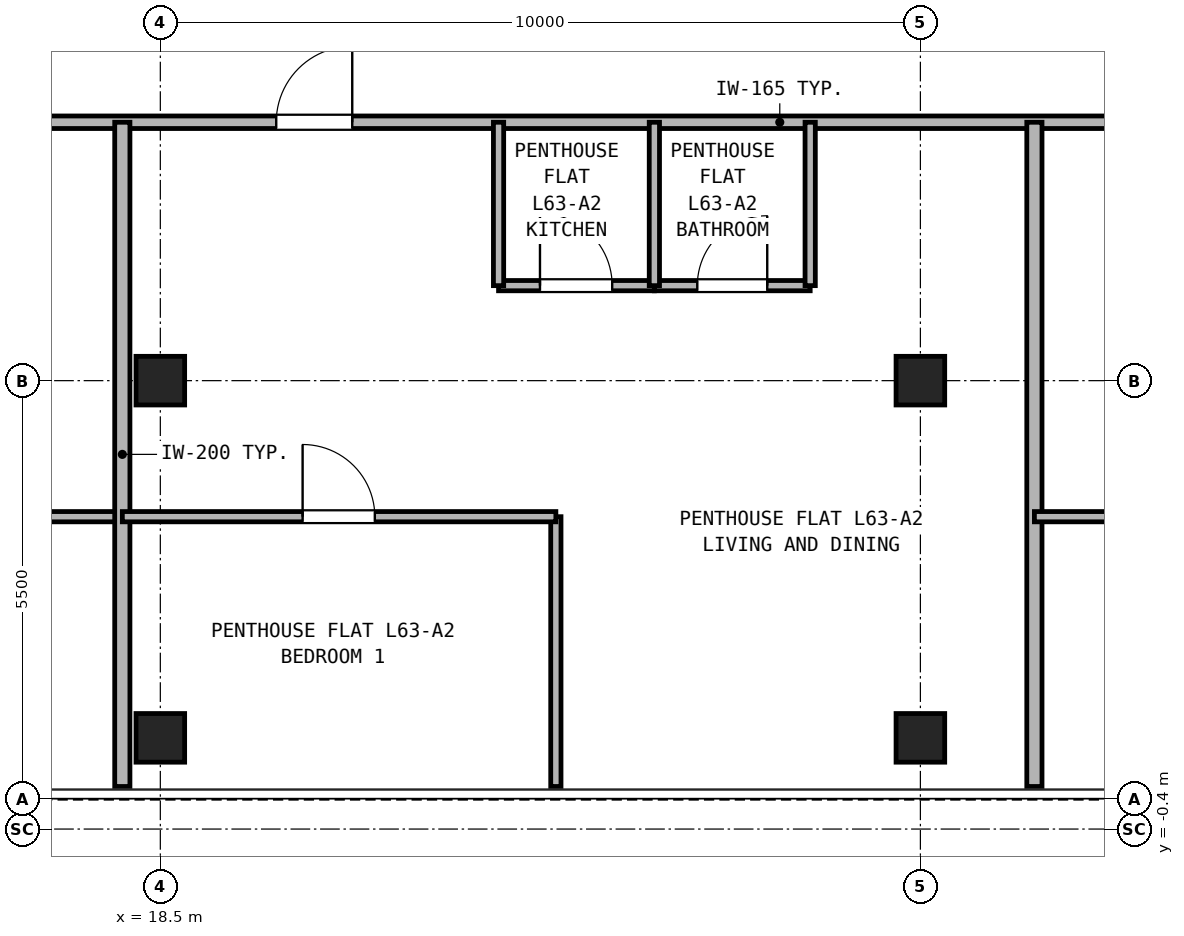
"""IFC4 building model, lengths in metres.
Left out: names, types, materials, properties, quantities, classifications, styles, units other than length and angle.
Written with IfcOpenShell. Run it as: python <this file> out.ifc"""

import sys

from ifc_helpers import new_model, si_unit, direction, frame, frame_2d, origin, origin_2d, place, context, subcontext, project, spatial, rectangle, hollow_rectangle, extrude, source, transform, mapped, element, fill, save


model = new_model("IFC4")
c1 = context("Model", 3, precision=1e-05, world=origin(), true_north=direction((0.0, 1.0)))
c2 = subcontext(c1, "Body", "Model", "MODEL_VIEW")
j1 = project(units=[si_unit("LENGTHUNIT", "METRE"), si_unit("PLANEANGLEUNIT", "RADIAN")], contexts=[c1])
p1 = place(None, origin())
s1 = spatial("IfcSite", under=j1, at=p1, CompositionType="ELEMENT")
p2 = place(p1, origin())
s2 = spatial("IfcBuilding", under=s1, at=p2, CompositionType="ELEMENT")
p3 = place(p2, frame((0.0, 0.0, 223.3)))
s3 = spatial("IfcBuildingStorey", under=s2, at=p3, CompositionType="ELEMENT", Elevation=223.3)
m1 = source(origin(), c2, "Body", "SweptSolid", [
    extrude(hollow_rectangle(XDim=0.64, YDim=0.64, WallThickness=0.035, at=origin_2d()), origin(), (0.0, 0.0, 1.0), 2.98),
])
for number, where, z_axis, x_axis in (
    (1, (18.5, 0.8, 0.0), (0.0, 0.0, 1.0), (1.0, 0.0, 0.0)),
    (2, (28.5, 0.8, 0.0), (0.0, 0.0, 1.0), (1.0, 0.0, 0.0)),
    (3, (18.5, 5.5, 0.0), (0.0, 0.0, 1.0), (1.0, 0.0, 0.0)),
    (4, (28.5, 5.5, 0.0), (0.0, 0.0, 1.0), (1.0, 0.0, 0.0)),
):
    element("IfcColumn", number, at=place(p3, frame(where, z_axis=z_axis, x_axis=x_axis)), inside=s3, PredefinedType="COLUMN", context=c2, shape_type="MappedRepresentation", body=[
        mapped(m1, transform((0.0, 0.0, 0.0), x_axis=(1.0, 0.0, 0.0), y_axis=(0.0, 1.0, 0.0), z_axis=(0.0, 0.0, 1.0), scale=1.0)),
    ])
p4 = place(p3, frame((5.36, 8.9, 0.0), z_axis=(0.0, 0.0, 1.0), x_axis=(1.0, 0.0, 0.0)))
e5 = element("IfcWall", 5, at=p4, inside=s3, PredefinedType="PARTITIONING", context=c2, shape_type="SweptSolid", body=[
    extrude(rectangle(XDim=36.28, YDim=0.165, at=frame_2d((18.14, 0.0))), origin(), (0.0, 0.0, 1.0), 2.98),
])
p5 = place(p4, frame((8.865, 0.0, 0.0)))
e6 = element("IfcOpeningElement", 6, at=p5, cuts=e5, PredefinedType="OPENING", context=c2, shape_type="SweptSolid", body=[
    extrude(rectangle(XDim=1.0, YDim=2.15, at=frame_2d((0.5, 1.075))), frame((0.0, 0.093, 0.0), z_axis=(0.0, -1.0, 0.0), x_axis=(1.0, 0.0, 0.0)), (0.0, 0.0, 1.0), 0.185),
])
p6 = place(p4, frame((14.665, 0.0, 0.0)))
e7 = element("IfcOpeningElement", 7, at=p6, cuts=e5, PredefinedType="OPENING", context=c2, shape_type="SweptSolid", body=[
    extrude(rectangle(XDim=1.0, YDim=2.15, at=frame_2d((0.5, 1.075))), frame((0.0, 0.093, 0.0), z_axis=(0.0, -1.0, 0.0), x_axis=(1.0, 0.0, 0.0)), (0.0, 0.0, 1.0), 0.185),
])
p7 = place(p4, frame((26.915, 0.0, 0.0)))
e8 = element("IfcOpeningElement", 8, at=p7, cuts=e5, PredefinedType="OPENING", context=c2, shape_type="SweptSolid", body=[
    extrude(rectangle(XDim=1.0, YDim=2.15, at=frame_2d((0.5, 1.075))), frame((0.0, 0.093, 0.0), z_axis=(0.0, -1.0, 0.0), x_axis=(1.0, 0.0, 0.0)), (0.0, 0.0, 1.0), 0.185),
])
p8 = place(p3, frame((12.451, 3.71, 0.0), z_axis=(0.0, 0.0, 1.0), x_axis=(1.0, 0.0, 0.0)))
e9 = element("IfcWall", 9, at=p8, inside=s3, PredefinedType="PARTITIONING", context=c2, shape_type="SweptSolid", body=[
    extrude(rectangle(XDim=5.549, YDim=0.135, at=frame_2d((2.774, 0.0))), origin(), (0.0, 0.0, 1.0), 2.98),
])
p9 = place(p8, frame((2.294, 0.0, 0.0)))
e10 = element("IfcOpeningElement", 10, at=p9, cuts=e9, PredefinedType="OPENING", context=c2, shape_type="SweptSolid", body=[
    extrude(rectangle(XDim=0.95, YDim=2.15, at=frame_2d((0.475, 1.075))), frame((0.0, 0.077, 0.0), z_axis=(0.0, -1.0, 0.0), x_axis=(1.0, 0.0, 0.0)), (0.0, 0.0, 1.0), 0.155),
])
p10 = place(p3, frame((18.0, 0.16, 0.0), z_axis=(0.0, 0.0, 1.0), x_axis=(0.0, 1.0, 0.0)))
e11 = element("IfcWall", 11, at=p10, inside=s3, PredefinedType="PARTITIONING", context=c2, shape_type="SweptSolid", body=[
    extrude(rectangle(XDim=8.74, YDim=0.2, at=frame_2d((4.37, 0.0))), origin(), (0.0, 0.0, 1.0), 2.98),
])
p11 = place(p3, frame((22.95, 6.75, 0.0), z_axis=(0.0, 0.0, 1.0), x_axis=(1.0, 0.0, 0.0)))
e12 = element("IfcWall", 12, at=p11, inside=s3, PredefinedType="PARTITIONING", context=c2, shape_type="SweptSolid", body=[
    extrude(rectangle(XDim=2.05, YDim=0.135, at=frame_2d((1.025, 0.0))), origin(), (0.0, 0.0, 1.0), 2.98),
])
p12 = place(p11, frame((0.545, 0.0, 0.0)))
e13 = element("IfcOpeningElement", 13, at=p12, cuts=e12, PredefinedType="OPENING", context=c2, shape_type="SweptSolid", body=[
    extrude(rectangle(XDim=0.95, YDim=2.15, at=frame_2d((0.475, 1.075))), frame((0.0, 0.077, 0.0), z_axis=(0.0, -1.0, 0.0), x_axis=(1.0, 0.0, 0.0)), (0.0, 0.0, 1.0), 0.155),
])
p13 = place(p3, frame((25.0, 6.75, 0.0), z_axis=(0.0, 0.0, 1.0), x_axis=(1.0, 0.0, 0.0)))
e14 = element("IfcWall", 14, at=p13, inside=s3, PredefinedType="PARTITIONING", context=c2, shape_type="SweptSolid", body=[
    extrude(rectangle(XDim=2.05, YDim=0.135, at=frame_2d((1.025, 0.0))), origin(), (0.0, 0.0, 1.0), 2.98),
])
p14 = place(p13, frame((0.565, 0.0, 0.0)))
e15 = element("IfcOpeningElement", 15, at=p14, cuts=e14, PredefinedType="OPENING", context=c2, shape_type="SweptSolid", body=[
    extrude(rectangle(XDim=0.92, YDim=2.1, at=frame_2d((0.46, 1.05))), frame((0.0, 0.077, 0.0), z_axis=(0.0, -1.0, 0.0), x_axis=(1.0, 0.0, 0.0)), (0.0, 0.0, 1.0), 0.155),
])
for number, where, z_axis, x_axis in (
    (16, (22.95, 6.75, 0.0), (0.0, 0.0, 1.0), (0.0, 1.0, 0.0)),
    (17, (25.0, 6.75, 0.0), (0.0, 0.0, 1.0), (0.0, 1.0, 0.0)),
    (18, (27.05, 6.75, 0.0), (0.0, 0.0, 1.0), (0.0, 1.0, 0.0)),
):
    element("IfcWall", number, at=place(p3, frame(where, z_axis=z_axis, x_axis=x_axis)), inside=s3, PredefinedType="PARTITIONING", context=c2, shape_type="SweptSolid", body=[
        extrude(rectangle(XDim=2.15, YDim=0.135, at=frame_2d((1.075, 0.0))), origin(), (0.0, 0.0, 1.0), 2.98),
    ])
p15 = place(p3, frame((23.704, 0.16, 0.0), z_axis=(0.0, 0.0, 1.0), x_axis=(0.0, 1.0, 0.0)))
e19 = element("IfcWall", 19, at=p15, inside=s3, PredefinedType="PARTITIONING", context=c2, shape_type="SweptSolid", body=[
    extrude(rectangle(XDim=3.55, YDim=0.135, at=frame_2d((1.775, 0.0))), origin(), (0.0, 0.0, 1.0), 2.98),
])
p16 = place(p3, frame((18.0, 3.71, 0.0), z_axis=(0.0, 0.0, 1.0), x_axis=(1.0, 0.0, 0.0)))
e20 = element("IfcWall", 20, at=p16, inside=s3, PredefinedType="PARTITIONING", context=c2, shape_type="SweptSolid", body=[
    extrude(rectangle(XDim=5.704, YDim=0.135, at=frame_2d((2.852, 0.0))), origin(), (0.0, 0.0, 1.0), 2.98),
])
p17 = place(p16, frame((2.372, 0.0, 0.0)))
e21 = element("IfcOpeningElement", 21, at=p17, cuts=e20, PredefinedType="OPENING", context=c2, shape_type="SweptSolid", body=[
    extrude(rectangle(XDim=0.95, YDim=2.15, at=frame_2d((0.475, 1.075))), frame((0.0, 0.077, 0.0), z_axis=(0.0, -1.0, 0.0), x_axis=(1.0, 0.0, 0.0)), (0.0, 0.0, 1.0), 0.155),
])
p18 = place(p3, frame((30.0, 0.16, 0.0), z_axis=(0.0, 0.0, 1.0), x_axis=(0.0, 1.0, 0.0)))
e22 = element("IfcWall", 22, at=p18, inside=s3, PredefinedType="PARTITIONING", context=c2, shape_type="SweptSolid", body=[
    extrude(rectangle(XDim=8.74, YDim=0.2, at=frame_2d((4.37, 0.0))), origin(), (0.0, 0.0, 1.0), 2.98),
])
p19 = place(p3, frame((30.0, 3.71, 0.0), z_axis=(0.0, 0.0, 1.0), x_axis=(1.0, 0.0, 0.0)))
e23 = element("IfcWall", 23, at=p19, inside=s3, PredefinedType="PARTITIONING", context=c2, shape_type="SweptSolid", body=[
    extrude(rectangle(XDim=4.929, YDim=0.135, at=frame_2d((2.464, 0.0))), origin(), (0.0, 0.0, 1.0), 2.98),
])
p20 = place(p19, frame((1.985, 0.0, 0.0)))
e24 = element("IfcOpeningElement", 24, at=p20, cuts=e23, PredefinedType="OPENING", context=c2, shape_type="SweptSolid", body=[
    extrude(rectangle(XDim=0.95, YDim=2.15, at=frame_2d((0.475, 1.075))), frame((0.0, 0.077, 0.0), z_axis=(0.0, -1.0, 0.0), x_axis=(1.0, 0.0, 0.0)), (0.0, 0.0, 1.0), 0.155),
])
p21 = place(p12, origin())
e25 = element("IfcDoor", 25, at=p21, inside=s3, OperationType="SINGLE_SWING_LEFT", PredefinedType="DOOR", context=c2, shape_type="SweptSolid", body=[
    extrude(rectangle(XDim=0.95, YDim=2.15, at=frame_2d((0.475, 1.075))), frame((0.0, 0.025, 0.0), z_axis=(0.0, -1.0, 0.0), x_axis=(1.0, 0.0, 0.0)), (0.0, 0.0, 1.0), 0.05),
])
fill(e13, e25)
p22 = place(p14, origin())
e26 = element("IfcDoor", 26, at=p22, inside=s3, OperationType="SINGLE_SWING_RIGHT", PredefinedType="DOOR", context=c2, shape_type="SweptSolid", body=[
    extrude(rectangle(XDim=0.92, YDim=2.1, at=frame_2d((0.46, 1.05))), frame((0.0, 0.025, 0.0), z_axis=(0.0, -1.0, 0.0), x_axis=(1.0, 0.0, 0.0)), (0.0, 0.0, 1.0), 0.05),
])
fill(e15, e26)
p23 = place(p17, frame((0.95, 0.0, 0.0), z_axis=(0.0, 0.0, 1.0), x_axis=(-1.0, 0.0, 0.0)))
e27 = element("IfcDoor", 27, at=p23, inside=s3, OperationType="SINGLE_SWING_LEFT", PredefinedType="DOOR", context=c2, shape_type="SweptSolid", body=[
    extrude(rectangle(XDim=0.95, YDim=2.15, at=frame_2d((0.475, 1.075))), frame((0.0, 0.025, 0.0), z_axis=(0.0, -1.0, 0.0), x_axis=(1.0, 0.0, 0.0)), (0.0, 0.0, 1.0), 0.05),
])
fill(e21, e27)
p24 = place(p6, frame((1.0, 0.0, 0.0), z_axis=(0.0, 0.0, 1.0), x_axis=(-1.0, 0.0, 0.0)))
e28 = element("IfcDoor", 28, at=p24, inside=s3, OperationType="SINGLE_SWING_RIGHT", PredefinedType="DOOR", context=c2, shape_type="SweptSolid", body=[
    extrude(rectangle(XDim=1.0, YDim=2.15, at=frame_2d((0.5, 1.075))), frame((0.0, 0.025, 0.0), z_axis=(0.0, -1.0, 0.0), x_axis=(1.0, 0.0, 0.0)), (0.0, 0.0, 1.0), 0.05),
])
fill(e7, e28)
save(model, sys.argv[1])
